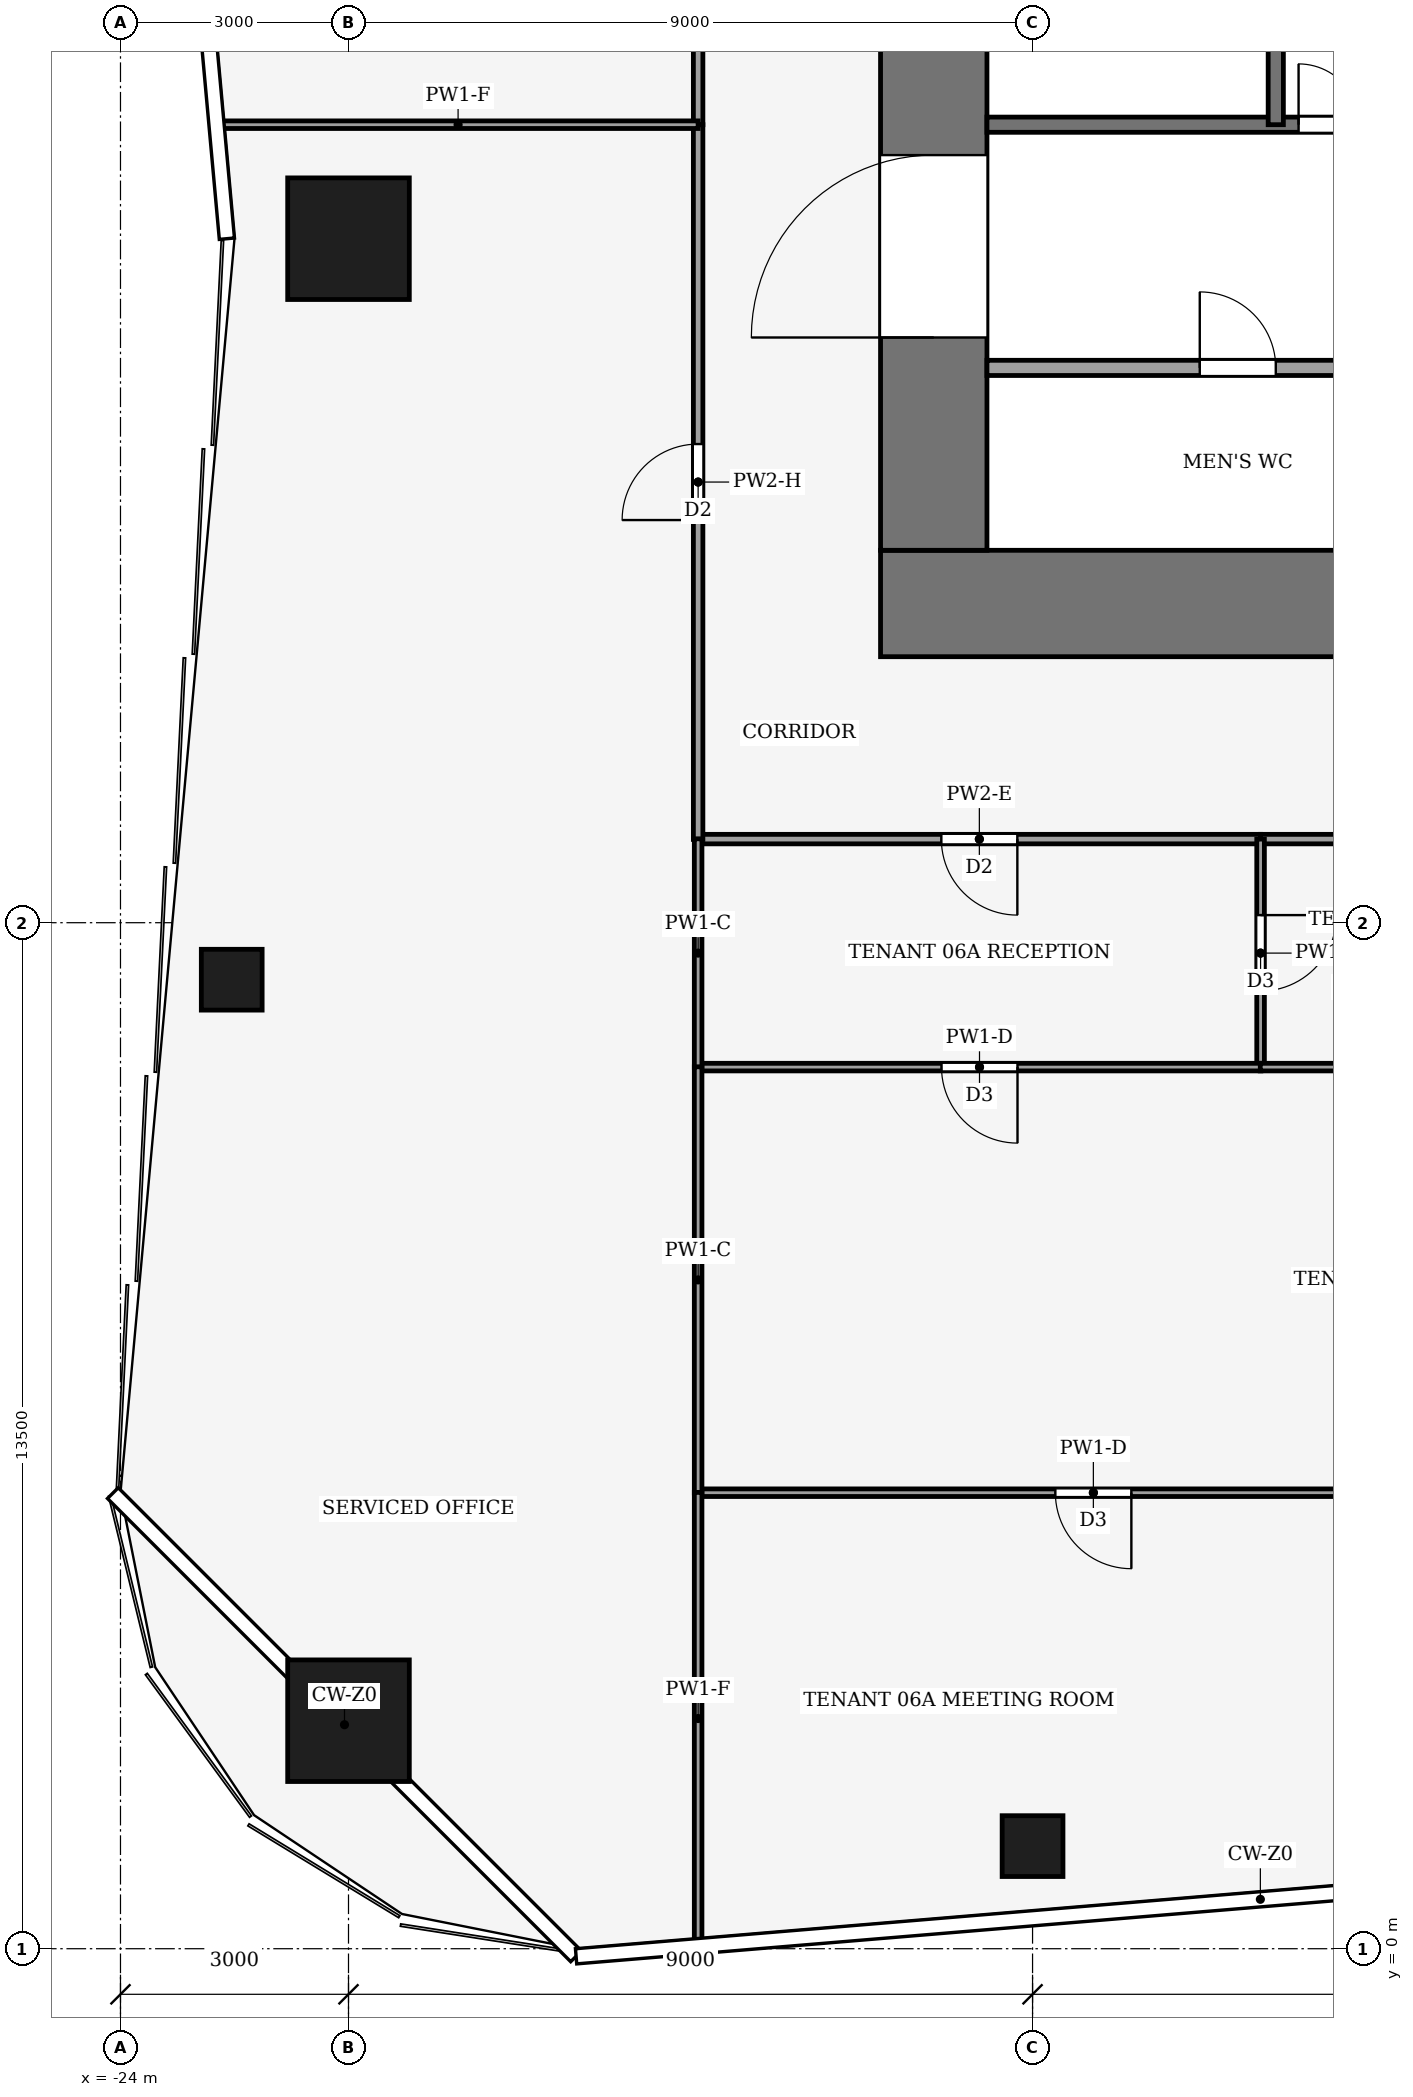
"""IFC4 building model, lengths in metres.
Left out: names, types, materials, properties, quantities, classifications, styles, units other than length and angle.
Written with IfcOpenShell. Run it as: python <this file> out.ifc"""

import sys

from ifc_helpers import new_model, si_unit, direction, frame, frame_2d, origin, origin_2d, place, context, subcontext, project, spatial, rectangle, hollow_rectangle, extrude, element, fill, save


model = new_model("IFC4")
c1 = context("Model", 3, precision=1e-05, world=origin(), true_north=direction((0.0, 1.0)))
c2 = subcontext(c1, "Body", "Model", "MODEL_VIEW")
j1 = project(units=[si_unit("LENGTHUNIT", "METRE"), si_unit("PLANEANGLEUNIT", "RADIAN")], contexts=[c1])
p1 = place(None, origin())
s1 = spatial("IfcSite", under=j1, at=p1, CompositionType="ELEMENT")
p2 = place(p1, origin())
s2 = spatial("IfcBuilding", under=s1, at=p2, CompositionType="ELEMENT")
p3 = place(p2, frame((0.0, 0.0, 30.0)))
s3 = spatial("IfcBuildingStorey", under=s2, at=p3, CompositionType="ELEMENT", Elevation=30.0)
p4 = place(p3, frame((-14.0, 17.7, -0.13), z_axis=(0.0, 0.0, 1.0), x_axis=(1.0, 0.0, 0.0)))
e1 = element("IfcWall", 1, at=p4, inside=s3, PredefinedType="SHEAR", context=c2, shape_type="SweptSolid", body=[
    extrude(rectangle(XDim=28.0, YDim=1.4, at=frame_2d((14.0, 0.0))), origin(), (0.0, 0.0, 1.0), 4.0),
])
p5 = place(p3, frame((-13.3, 18.4, -0.13), z_axis=(0.0, 0.0, 1.0), x_axis=(0.0, 1.0, 0.0)))
e2 = element("IfcWall", 2, at=p5, inside=s3, PredefinedType="SHEAR", context=c2, shape_type="SweptSolid", body=[
    extrude(rectangle(XDim=19.2, YDim=1.4, at=frame_2d((9.6, 0.0))), origin(), (0.0, 0.0, 1.0), 4.0),
])
p6 = place(p5, frame((2.8, 0.0, 0.13)))
e3 = element("IfcOpeningElement", 3, at=p6, cuts=e2, PredefinedType="OPENING", context=c2, shape_type="SweptSolid", body=[
    extrude(rectangle(XDim=2.4, YDim=2.4, at=frame_2d((1.2, 1.2))), frame((0.0, 0.71, 0.0), z_axis=(0.0, -1.0, 0.0), x_axis=(1.0, 0.0, 0.0)), (0.0, 0.0, 1.0), 1.42),
])
p7 = place(p5, frame((13.4, 0.0, 0.13)))
e4 = element("IfcOpeningElement", 4, at=p7, cuts=e2, PredefinedType="OPENING", context=c2, shape_type="SweptSolid", body=[
    extrude(rectangle(XDim=1.4, YDim=2.2, at=frame_2d((0.7, 1.1))), frame((0.0, 0.71, 0.0), z_axis=(0.0, -1.0, 0.0), x_axis=(1.0, 0.0, 0.0)), (0.0, 0.0, 1.0), 1.42),
])
for number, where, z_axis, x_axis in (
    (5, (-21.0, 3.0, 0.0), (0.0, 0.0, 1.0), (1.0, 0.0, 0.0)),
    (6, (-21.0, 22.5, 0.0), (0.0, 0.0, 1.0), (1.0, 0.0, 0.0)),
):
    element("IfcColumn", number, at=place(p3, frame(where, z_axis=z_axis, x_axis=x_axis)), inside=s3, PredefinedType="COLUMN", context=c2, shape_type="SweptSolid", body=[
        extrude(hollow_rectangle(XDim=1.6, YDim=1.6, WallThickness=0.09, at=origin_2d()), origin(), (0.0, 0.0, 1.0), 4.0),
    ])
for number, where, z_axis, x_axis in (
    (7, (-12.0, 1.35, 0.0), (0.0, 0.0, 1.0), (1.0, 0.0, 0.0)),
    (8, (-22.536, 12.75, 0.0), (0.0, 0.0, 1.0), (1.0, 0.0, 0.0)),
):
    element("IfcColumn", number, at=place(p3, frame(where, z_axis=z_axis, x_axis=x_axis)), inside=s3, PredefinedType="COLUMN", context=c2, shape_type="SweptSolid", body=[
        extrude(hollow_rectangle(XDim=0.8, YDim=0.8, WallThickness=0.04, at=origin_2d()), origin(), (0.0, 0.0, 1.0), 4.0),
    ])
p8 = place(p3, frame((-12.6, 20.8, 0.0), z_axis=(0.0, 0.0, 1.0), x_axis=(1.0, 0.0, 0.0)))
e9 = element("IfcWall", 9, at=p8, inside=s3, PredefinedType="PARTITIONING", context=c2, shape_type="SweptSolid", body=[
    extrude(rectangle(XDim=6.6, YDim=0.2, at=frame_2d((3.3, 0.0))), origin(), (0.0, 0.0, 1.0), 3.87),
])
p9 = place(p8, frame((2.8, 0.0, 0.0)))
e10 = element("IfcOpeningElement", 10, at=p9, cuts=e9, PredefinedType="OPENING", context=c2, shape_type="SweptSolid", body=[
    extrude(rectangle(XDim=1.0, YDim=2.1, at=frame_2d((0.5, 1.05))), frame((0.0, 0.11, 0.0), z_axis=(0.0, -1.0, 0.0), x_axis=(1.0, 0.0, 0.0)), (0.0, 0.0, 1.0), 0.22),
])
p10 = place(p3, frame((-12.6, 24.0, 0.0), z_axis=(0.0, 0.0, 1.0), x_axis=(1.0, 0.0, 0.0)))
e11 = element("IfcWall", 11, at=p10, inside=s3, PredefinedType="PARTITIONING", context=c2, shape_type="SweptSolid", body=[
    extrude(rectangle(XDim=6.6, YDim=0.2, at=frame_2d((3.3, 0.0))), origin(), (0.0, 0.0, 1.0), 3.87),
])
p11 = place(p10, frame((4.1, 0.0, 0.0)))
e12 = element("IfcOpeningElement", 12, at=p11, cuts=e11, PredefinedType="OPENING", context=c2, shape_type="SweptSolid", body=[
    extrude(rectangle(XDim=0.8, YDim=2.1, at=frame_2d((0.4, 1.05))), frame((0.0, 0.11, 0.0), z_axis=(0.0, -1.0, 0.0), x_axis=(1.0, 0.0, 0.0)), (0.0, 0.0, 1.0), 0.22),
])
p12 = place(p10, frame((5.5, 0.0, 0.0)))
e13 = element("IfcOpeningElement", 13, at=p12, cuts=e11, PredefinedType="OPENING", context=c2, shape_type="SweptSolid", body=[
    extrude(rectangle(XDim=0.8, YDim=2.1, at=frame_2d((0.4, 1.05))), frame((0.0, 0.11, 0.0), z_axis=(0.0, -1.0, 0.0), x_axis=(1.0, 0.0, 0.0)), (0.0, 0.0, 1.0), 0.22),
])
p13 = place(p3, frame((-8.8, 24.0, 0.0), z_axis=(0.0, 0.0, 1.0), x_axis=(0.0, 1.0, 0.0)))
e14 = element("IfcWall", 14, at=p13, inside=s3, PredefinedType="PARTITIONING", context=c2, shape_type="SweptSolid", body=[
    extrude(rectangle(XDim=7.4, YDim=0.2, at=frame_2d((3.7, 0.0))), origin(), (0.0, 0.0, 1.0), 3.87),
])
p14 = place(p3, frame((-9.0, 14.6, 0.0), z_axis=(0.0, 0.0, 1.0), x_axis=(-1.0, 0.0, 0.0)))
e15 = element("IfcWall", 15, at=p14, inside=s3, PredefinedType="PARTITIONING", context=c2, shape_type="SweptSolid", body=[
    extrude(rectangle(XDim=7.4, YDim=0.125, at=frame_2d((3.7, 0.0))), origin(), (0.0, 0.0, 1.0), 3.29),
])
p15 = place(p14, frame((3.2, 0.0, 0.0)))
e16 = element("IfcOpeningElement", 16, at=p15, cuts=e15, PredefinedType="OPENING", context=c2, shape_type="SweptSolid", body=[
    extrude(rectangle(XDim=1.0, YDim=2.1, at=frame_2d((0.5, 1.05))), frame((0.0, 0.073, 0.0), z_axis=(0.0, -1.0, 0.0), x_axis=(1.0, 0.0, 0.0)), (0.0, 0.0, 1.0), 0.145),
])
p16 = place(p3, frame((-9.0, 14.6, 0.0), z_axis=(0.0, 0.0, 1.0), x_axis=(1.0, 0.0, 0.0)))
e17 = element("IfcWall", 17, at=p16, inside=s3, PredefinedType="PARTITIONING", context=c2, shape_type="SweptSolid", body=[
    extrude(rectangle(XDim=3.0, YDim=0.125, at=frame_2d((1.5, 0.0))), origin(), (0.0, 0.0, 1.0), 3.29),
])
p17 = place(p3, frame((-16.4, 14.596, 0.0), z_axis=(0.0, 0.0, 1.0), x_axis=(0.0, 1.0, 0.0)))
e18 = element("IfcWall", 18, at=p17, inside=s3, PredefinedType="PARTITIONING", context=c2, shape_type="SweptSolid", body=[
    extrude(rectangle(XDim=9.404, YDim=0.125, at=frame_2d((4.702, 0.0))), origin(), (0.0, 0.0, 1.0), 3.14),
])
p18 = place(p17, frame((4.202, 0.0, 0.0)))
e19 = element("IfcOpeningElement", 19, at=p18, cuts=e18, PredefinedType="OPENING", context=c2, shape_type="SweptSolid", body=[
    extrude(rectangle(XDim=1.0, YDim=2.1, at=frame_2d((0.5, 1.05))), frame((0.0, 0.073, 0.0), z_axis=(0.0, -1.0, 0.0), x_axis=(1.0, 0.0, 0.0)), (0.0, 0.0, 1.0), 0.145),
])
p19 = place(p3, frame((-16.4, 24.0, 0.0), z_axis=(0.0, 0.0, 1.0), x_axis=(0.0, 1.0, 0.0)))
e20 = element("IfcWall", 20, at=p19, inside=s3, PredefinedType="PARTITIONING", context=c2, shape_type="SweptSolid", body=[
    extrude(rectangle(XDim=12.0, YDim=0.125, at=frame_2d((6.0, 0.0))), origin(), (0.0, 0.0, 1.0), 3.48),
])
p20 = place(p19, frame((5.5, 0.0, 0.0)))
e21 = element("IfcOpeningElement", 21, at=p20, cuts=e20, PredefinedType="OPENING", context=c2, shape_type="SweptSolid", body=[
    extrude(rectangle(XDim=1.0, YDim=2.1, at=frame_2d((0.5, 1.05))), frame((0.0, 0.073, 0.0), z_axis=(0.0, -1.0, 0.0), x_axis=(1.0, 0.0, 0.0)), (0.0, 0.0, 1.0), 0.145),
])
p21 = place(p3, frame((-9.0, 14.6, 0.0), z_axis=(0.0, 0.0, 1.0), x_axis=(0.0, -1.0, 0.0)))
e22 = element("IfcWall", 22, at=p21, inside=s3, PredefinedType="PARTITIONING", context=c2, shape_type="SweptSolid", body=[
    extrude(rectangle(XDim=3.0, YDim=0.1, at=frame_2d((1.5, 0.0))), origin(), (0.0, 0.0, 1.0), 3.87),
])
p22 = place(p21, frame((1.0, 0.0, 0.0)))
e23 = element("IfcOpeningElement", 23, at=p22, cuts=e22, PredefinedType="OPENING", context=c2, shape_type="SweptSolid", body=[
    extrude(rectangle(XDim=1.0, YDim=2.1, at=frame_2d((0.5, 1.05))), frame((0.0, 0.06, 0.0), z_axis=(0.0, -1.0, 0.0), x_axis=(1.0, 0.0, 0.0)), (0.0, 0.0, 1.0), 0.12),
])
p23 = place(p3, frame((-8.996, 11.6, 0.0), z_axis=(0.0, 0.0, 1.0), x_axis=(-1.0, 0.0, 0.0)))
e24 = element("IfcWall", 24, at=p23, inside=s3, PredefinedType="PARTITIONING", context=c2, shape_type="SweptSolid", body=[
    extrude(rectangle(XDim=7.404, YDim=0.1, at=frame_2d((3.702, 0.0))), origin(), (0.0, 0.0, 1.0), 3.29),
])
p24 = place(p23, frame((3.202, 0.0, 0.0)))
e25 = element("IfcOpeningElement", 25, at=p24, cuts=e24, PredefinedType="OPENING", context=c2, shape_type="SweptSolid", body=[
    extrude(rectangle(XDim=1.0, YDim=2.1, at=frame_2d((0.5, 1.05))), frame((0.0, 0.06, 0.0), z_axis=(0.0, -1.0, 0.0), x_axis=(1.0, 0.0, 0.0)), (0.0, 0.0, 1.0), 0.12),
])
p25 = place(p3, frame((-16.4, 14.604, 0.0), z_axis=(0.0, 0.0, 1.0), x_axis=(0.0, -1.0, 0.0)))
e26 = element("IfcWall", 26, at=p25, inside=s3, PredefinedType="PARTITIONING", context=c2, shape_type="SweptSolid", body=[
    extrude(rectangle(XDim=3.008, YDim=0.1, at=frame_2d((1.504, 0.0))), origin(), (0.0, 0.0, 1.0), 3.87),
])
p26 = place(p3, frame((-9.004, 11.6, 0.0), z_axis=(0.0, 0.0, 1.0), x_axis=(1.0, 0.0, 0.0)))
e27 = element("IfcWall", 27, at=p26, inside=s3, PredefinedType="PARTITIONING", context=c2, shape_type="SweptSolid", body=[
    extrude(rectangle(XDim=3.008, YDim=0.1, at=frame_2d((1.504, 0.0))), origin(), (0.0, 0.0, 1.0), 3.29),
])
p27 = place(p3, frame((-6.0, 6.0, 0.0), z_axis=(0.0, 0.0, 1.0), x_axis=(-1.0, 0.0, 0.0)))
e28 = element("IfcWall", 28, at=p27, inside=s3, PredefinedType="PARTITIONING", context=c2, shape_type="SweptSolid", body=[
    extrude(rectangle(XDim=10.4, YDim=0.1, at=frame_2d((5.2, 0.0))), origin(), (0.0, 0.0, 1.0), 3.29),
])
p28 = place(p27, frame((4.7, 0.0, 0.0)))
e29 = element("IfcOpeningElement", 29, at=p28, cuts=e28, PredefinedType="OPENING", context=c2, shape_type="SweptSolid", body=[
    extrude(rectangle(XDim=1.0, YDim=2.1, at=frame_2d((0.5, 1.05))), frame((0.0, 0.06, 0.0), z_axis=(0.0, -1.0, 0.0), x_axis=(1.0, 0.0, 0.0)), (0.0, 0.0, 1.0), 0.12),
])
p29 = place(p3, frame((-16.4, 11.604, 0.0), z_axis=(0.0, 0.0, 1.0), x_axis=(0.0, -1.0, 0.0)))
e30 = element("IfcWall", 30, at=p29, inside=s3, PredefinedType="PARTITIONING", context=c2, shape_type="SweptSolid", body=[
    extrude(rectangle(XDim=5.608, YDim=0.1, at=frame_2d((2.804, 0.0))), origin(), (0.0, 0.0, 1.0), 3.87),
])
p30 = place(p3, frame((-16.4, 6.004, 0.0), z_axis=(0.0, 0.0, 1.0), x_axis=(0.0, -1.0, 0.0)))
e31 = element("IfcWall", 31, at=p30, inside=s3, PredefinedType="PARTITIONING", context=c2, shape_type="SweptSolid", body=[
    extrude(rectangle(XDim=5.951, YDim=0.1, at=frame_2d((2.975, 0.0))), origin(), (0.0, 0.0, 1.0), 3.04),
])
p31 = place(p3, frame((-16.4, 24.0, 0.0), z_axis=(0.0, 0.0, 1.0), x_axis=(-1.0, 0.0, 0.0)))
e32 = element("IfcWall", 32, at=p31, inside=s3, PredefinedType="PARTITIONING", context=c2, shape_type="SweptSolid", body=[
    extrude(rectangle(XDim=6.316, YDim=0.1, at=frame_2d((3.158, 0.0))), origin(), (0.0, 0.0, 1.0), 3.04),
])
p32 = place(p9, origin())
e33 = element("IfcDoor", 33, at=p32, inside=s3, OperationType="SINGLE_SWING_LEFT", PredefinedType="DOOR", context=c2, shape_type="SweptSolid", body=[
    extrude(rectangle(XDim=1.0, YDim=2.1, at=frame_2d((0.5, 1.05))), frame((0.0, 0.025, 0.0), z_axis=(0.0, -1.0, 0.0), x_axis=(1.0, 0.0, 0.0)), (0.0, 0.0, 1.0), 0.05),
])
fill(e10, e33)
p33 = place(p11, origin())
e34 = element("IfcDoor", 34, at=p33, inside=s3, OperationType="SINGLE_SWING_LEFT", PredefinedType="DOOR", context=c2, shape_type="SweptSolid", body=[
    extrude(rectangle(XDim=0.8, YDim=2.1, at=frame_2d((0.4, 1.05))), frame((0.0, 0.025, 0.0), z_axis=(0.0, -1.0, 0.0), x_axis=(1.0, 0.0, 0.0)), (0.0, 0.0, 1.0), 0.05),
])
fill(e12, e34)
p34 = place(p6, origin())
e35 = element("IfcDoor", 35, at=p34, inside=s3, OperationType="DOUBLE_DOOR_SINGLE_SWING", PredefinedType="DOOR", context=c2, shape_type="SweptSolid", body=[
    extrude(rectangle(XDim=2.4, YDim=2.4, at=frame_2d((1.2, 1.2))), frame((0.0, 0.025, 0.0), z_axis=(0.0, -1.0, 0.0), x_axis=(1.0, 0.0, 0.0)), (0.0, 0.0, 1.0), 0.05),
])
fill(e3, e35)
p35 = place(p15, origin())
e36 = element("IfcDoor", 36, at=p35, inside=s3, OperationType="SINGLE_SWING_LEFT", PredefinedType="DOOR", context=c2, shape_type="SweptSolid", body=[
    extrude(rectangle(XDim=1.0, YDim=2.1, at=frame_2d((0.5, 1.05))), frame((0.0, 0.025, 0.0), z_axis=(0.0, -1.0, 0.0), x_axis=(1.0, 0.0, 0.0)), (0.0, 0.0, 1.0), 0.05),
])
fill(e16, e36)
p36 = place(p18, origin())
e37 = element("IfcDoor", 37, at=p36, inside=s3, OperationType="SINGLE_SWING_RIGHT", PredefinedType="DOOR", context=c2, shape_type="SweptSolid", body=[
    extrude(rectangle(XDim=1.0, YDim=2.1, at=frame_2d((0.5, 1.05))), frame((0.0, 0.025, 0.0), z_axis=(0.0, -1.0, 0.0), x_axis=(1.0, 0.0, 0.0)), (0.0, 0.0, 1.0), 0.05),
])
fill(e19, e37)
p37 = place(p22, origin())
e38 = element("IfcDoor", 38, at=p37, inside=s3, OperationType="SINGLE_SWING_RIGHT", PredefinedType="DOOR", context=c2, shape_type="SweptSolid", body=[
    extrude(rectangle(XDim=1.0, YDim=2.1, at=frame_2d((0.5, 1.05))), frame((0.0, 0.025, 0.0), z_axis=(0.0, -1.0, 0.0), x_axis=(1.0, 0.0, 0.0)), (0.0, 0.0, 1.0), 0.05),
])
fill(e23, e38)
p38 = place(p24, origin())
e39 = element("IfcDoor", 39, at=p38, inside=s3, OperationType="SINGLE_SWING_LEFT", PredefinedType="DOOR", context=c2, shape_type="SweptSolid", body=[
    extrude(rectangle(XDim=1.0, YDim=2.1, at=frame_2d((0.5, 1.05))), frame((0.0, 0.025, 0.0), z_axis=(0.0, -1.0, 0.0), x_axis=(1.0, 0.0, 0.0)), (0.0, 0.0, 1.0), 0.05),
])
fill(e25, e39)
p39 = place(p28, origin())
e40 = element("IfcDoor", 40, at=p39, inside=s3, OperationType="SINGLE_SWING_LEFT", PredefinedType="DOOR", context=c2, shape_type="SweptSolid", body=[
    extrude(rectangle(XDim=1.0, YDim=2.1, at=frame_2d((0.5, 1.05))), frame((0.0, 0.025, 0.0), z_axis=(0.0, -1.0, 0.0), x_axis=(1.0, 0.0, 0.0)), (0.0, 0.0, 1.0), 0.05),
])
fill(e29, e40)
save(model, sys.argv[1])
